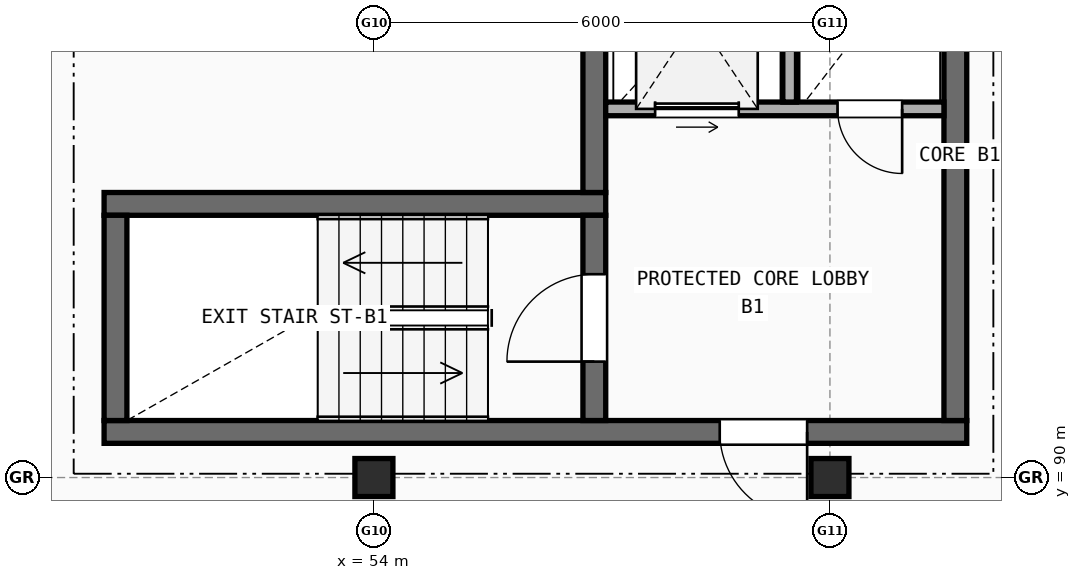
"""IFC4 building model, lengths in metres.
Left out: names, types, materials, properties, quantities, classifications, styles, units other than length and angle.
Written with IfcOpenShell. Run it as: python <this file> out.ifc"""

import sys

from ifc_helpers import new_model, si_unit, direction, frame, frame_2d, origin, origin_2d, place, context, subcontext, project, spatial, rectangle, extrude, element, fill, save


model = new_model("IFC4")
c1 = context("Model", 3, precision=1e-05, world=origin(), true_north=direction((0.0, 1.0)))
c2 = subcontext(c1, "Body", "Model", "MODEL_VIEW")
j1 = project(units=[si_unit("LENGTHUNIT", "METRE"), si_unit("PLANEANGLEUNIT", "RADIAN")], contexts=[c1])
p1 = place(None, origin())
s1 = spatial("IfcSite", under=j1, at=p1, CompositionType="ELEMENT")
p2 = place(p1, origin())
s2 = spatial("IfcBuilding", under=s1, at=p2, CompositionType="ELEMENT")
p3 = place(p2, frame((0.0, 0.0, 33.3)))
s3 = spatial("IfcBuildingStorey", under=s2, at=p3, CompositionType="ELEMENT", Elevation=33.3)
for number, where, z_axis, x_axis in (
    (1, (54.0, 90.0, 0.0), (0.0, 0.0, 1.0), (1.0, 0.0, 0.0)),
    (2, (60.0, 90.0, 0.0), (0.0, 0.0, 1.0), (1.0, 0.0, 0.0)),
):
    element("IfcColumn", number, at=place(p3, frame(where, z_axis=z_axis, x_axis=x_axis)), inside=s3, PredefinedType="COLUMN", context=c2, shape_type="SweptSolid", body=[
        extrude(rectangle(XDim=0.5, YDim=0.5, at=origin_2d()), origin(), (0.0, 0.0, 1.0), 2.99),
    ])
p4 = place(p3, frame((50.45, 90.6, 0.0), z_axis=(0.0, 0.0, 1.0), x_axis=(1.0, 0.0, 0.0)))
e3 = element("IfcWall", 3, at=p4, inside=s3, PredefinedType="SHEAR", context=c2, shape_type="SweptSolid", body=[
    extrude(rectangle(XDim=11.35, YDim=0.3, at=frame_2d((5.675, 0.0))), origin(), (0.0, 0.0, 1.0), 2.99),
])
p5 = place(p4, frame((8.1, 0.0, 0.0)))
e4 = element("IfcOpeningElement", 4, at=p5, cuts=e3, PredefinedType="OPENING", context=c2, shape_type="SweptSolid", body=[
    extrude(rectangle(XDim=1.15, YDim=2.15, at=frame_2d((0.575, 1.075))), frame((0.0, 0.16, 0.0), z_axis=(0.0, -1.0, 0.0), x_axis=(1.0, 0.0, 0.0)), (0.0, 0.0, 1.0), 0.32),
])
p6 = place(p3, frame((57.05, 93.6, 0.0), z_axis=(0.0, 0.0, 1.0), x_axis=(-1.0, 0.0, 0.0)))
e5 = element("IfcWall", 5, at=p6, inside=s3, PredefinedType="SHEAR", context=c2, shape_type="SweptSolid", body=[
    extrude(rectangle(XDim=6.6, YDim=0.3, at=frame_2d((3.3, 0.0))), origin(), (0.0, 0.0, 1.0), 2.99),
])
p7 = place(p3, frame((50.6, 93.45, 0.0), z_axis=(0.0, 0.0, 1.0), x_axis=(0.0, -1.0, 0.0)))
e6 = element("IfcWall", 6, at=p7, inside=s3, PredefinedType="SHEAR", context=c2, shape_type="SweptSolid", body=[
    extrude(rectangle(XDim=2.7, YDim=0.3, at=frame_2d((1.35, 0.0))), origin(), (0.0, 0.0, 1.0), 2.99),
])
p8 = place(p3, frame((56.9, 90.75, 0.0), z_axis=(0.0, 0.0, 1.0), x_axis=(0.0, 1.0, 0.0)))
e7 = element("IfcWall", 7, at=p8, inside=s3, PredefinedType="SHEAR", context=c2, shape_type="SweptSolid", body=[
    extrude(rectangle(XDim=2.7, YDim=0.3, at=frame_2d((1.35, 0.0))), origin(), (0.0, 0.0, 1.0), 2.99),
])
p9 = place(p8, frame((0.775, 0.0, 0.0)))
e8 = element("IfcOpeningElement", 8, at=p9, cuts=e7, PredefinedType="OPENING", context=c2, shape_type="SweptSolid", body=[
    extrude(rectangle(XDim=1.15, YDim=2.15, at=frame_2d((0.575, 1.075))), frame((0.0, 0.16, 0.0), z_axis=(0.0, -1.0, 0.0), x_axis=(1.0, 0.0, 0.0)), (0.0, 0.0, 1.0), 0.32),
])
p10 = place(p3, frame((61.65, 90.75, 0.0), z_axis=(0.0, 0.0, 1.0), x_axis=(0.0, 1.0, 0.0)))
e9 = element("IfcWall", 9, at=p10, inside=s3, PredefinedType="SHEAR", context=c2, shape_type="SweptSolid", body=[
    extrude(rectangle(XDim=6.45, YDim=0.3, at=frame_2d((3.225, 0.0))), origin(), (0.0, 0.0, 1.0), 2.99),
])
p11 = place(p3, frame((56.9, 93.75, 0.0), z_axis=(0.0, 0.0, 1.0), x_axis=(0.0, 1.0, 0.0)))
e10 = element("IfcWall", 10, at=p11, inside=s3, PredefinedType="SHEAR", context=c2, shape_type="SweptSolid", body=[
    extrude(rectangle(XDim=3.45, YDim=0.3, at=frame_2d((1.725, 0.0))), origin(), (0.0, 0.0, 1.0), 2.99),
])
p12 = place(p3, frame((57.05, 94.85, 0.0), z_axis=(0.0, 0.0, 1.0), x_axis=(1.0, 0.0, 0.0)))
e11 = element("IfcWall", 11, at=p12, inside=s3, PredefinedType="SOLIDWALL", context=c2, shape_type="SweptSolid", body=[
    extrude(rectangle(XDim=4.45, YDim=0.18, at=frame_2d((2.225, 0.0))), origin(), (0.0, 0.0, 1.0), 2.99),
])
p13 = place(p12, frame((0.65, 0.0, 0.0)))
e12 = element("IfcOpeningElement", 12, at=p13, cuts=e11, PredefinedType="OPENING", context=c2, shape_type="SweptSolid", body=[
    extrude(rectangle(XDim=1.1, YDim=2.15, at=frame_2d((0.55, 1.075))), frame((0.0, 0.1, 0.0), z_axis=(0.0, -1.0, 0.0), x_axis=(1.0, 0.0, 0.0)), (0.0, 0.0, 1.0), 0.2),
])
p14 = place(p12, frame((3.05, 0.0, 0.0)))
e13 = element("IfcOpeningElement", 13, at=p14, cuts=e11, PredefinedType="OPENING", context=c2, shape_type="SweptSolid", body=[
    extrude(rectangle(XDim=0.85, YDim=2.1, at=frame_2d((0.425, 1.05))), frame((0.0, 0.1, 0.0), z_axis=(0.0, -1.0, 0.0), x_axis=(1.0, 0.0, 0.0)), (0.0, 0.0, 1.0), 0.2),
])
p15 = place(p3, frame((59.47, 94.94, 0.0), z_axis=(0.0, 0.0, 1.0), x_axis=(0.0, 1.0, 0.0)))
e14 = element("IfcWall", 14, at=p15, inside=s3, PredefinedType="SOLIDWALL", context=c2, shape_type="SweptSolid", body=[
    extrude(rectangle(XDim=2.26, YDim=0.18, at=frame_2d((1.13, 0.0))), origin(), (0.0, 0.0, 1.0), 2.99),
])
p16 = place(p5, origin())
e15 = element("IfcDoor", 15, at=p16, inside=s3, OperationType="SINGLE_SWING_RIGHT", PredefinedType="DOOR", context=c2, shape_type="SweptSolid", body=[
    extrude(rectangle(XDim=1.15, YDim=2.15, at=frame_2d((0.575, 1.075))), frame((0.0, 0.025, 0.0), z_axis=(0.0, -1.0, 0.0), x_axis=(1.0, 0.0, 0.0)), (0.0, 0.0, 1.0), 0.05),
])
fill(e4, e15)
p17 = place(p9, origin())
e16 = element("IfcDoor", 16, at=p17, inside=s3, OperationType="SINGLE_SWING_LEFT", PredefinedType="DOOR", context=c2, shape_type="SweptSolid", body=[
    extrude(rectangle(XDim=1.15, YDim=2.15, at=frame_2d((0.575, 1.075))), frame((0.0, 0.025, 0.0), z_axis=(0.0, -1.0, 0.0), x_axis=(1.0, 0.0, 0.0)), (0.0, 0.0, 1.0), 0.05),
])
fill(e8, e16)
p18 = place(p13, origin())
e17 = element("IfcDoor", 17, at=p18, inside=s3, OperationType="SLIDING_TO_LEFT", PredefinedType="DOOR", context=c2, shape_type="SweptSolid", body=[
    extrude(rectangle(XDim=1.1, YDim=2.15, at=frame_2d((0.55, 1.075))), frame((0.0, 0.025, 0.0), z_axis=(0.0, -1.0, 0.0), x_axis=(1.0, 0.0, 0.0)), (0.0, 0.0, 1.0), 0.05),
])
fill(e12, e17)
p19 = place(p14, frame((0.85, 0.0, 0.0), z_axis=(0.0, 0.0, 1.0), x_axis=(-1.0, 0.0, 0.0)))
e18 = element("IfcDoor", 18, at=p19, inside=s3, OperationType="SINGLE_SWING_RIGHT", PredefinedType="DOOR", context=c2, shape_type="SweptSolid", body=[
    extrude(rectangle(XDim=0.85, YDim=2.1, at=frame_2d((0.425, 1.05))), frame((0.0, 0.025, 0.0), z_axis=(0.0, -1.0, 0.0), x_axis=(1.0, 0.0, 0.0)), (0.0, 0.0, 1.0), 0.05),
])
fill(e13, e18)
save(model, sys.argv[1])
